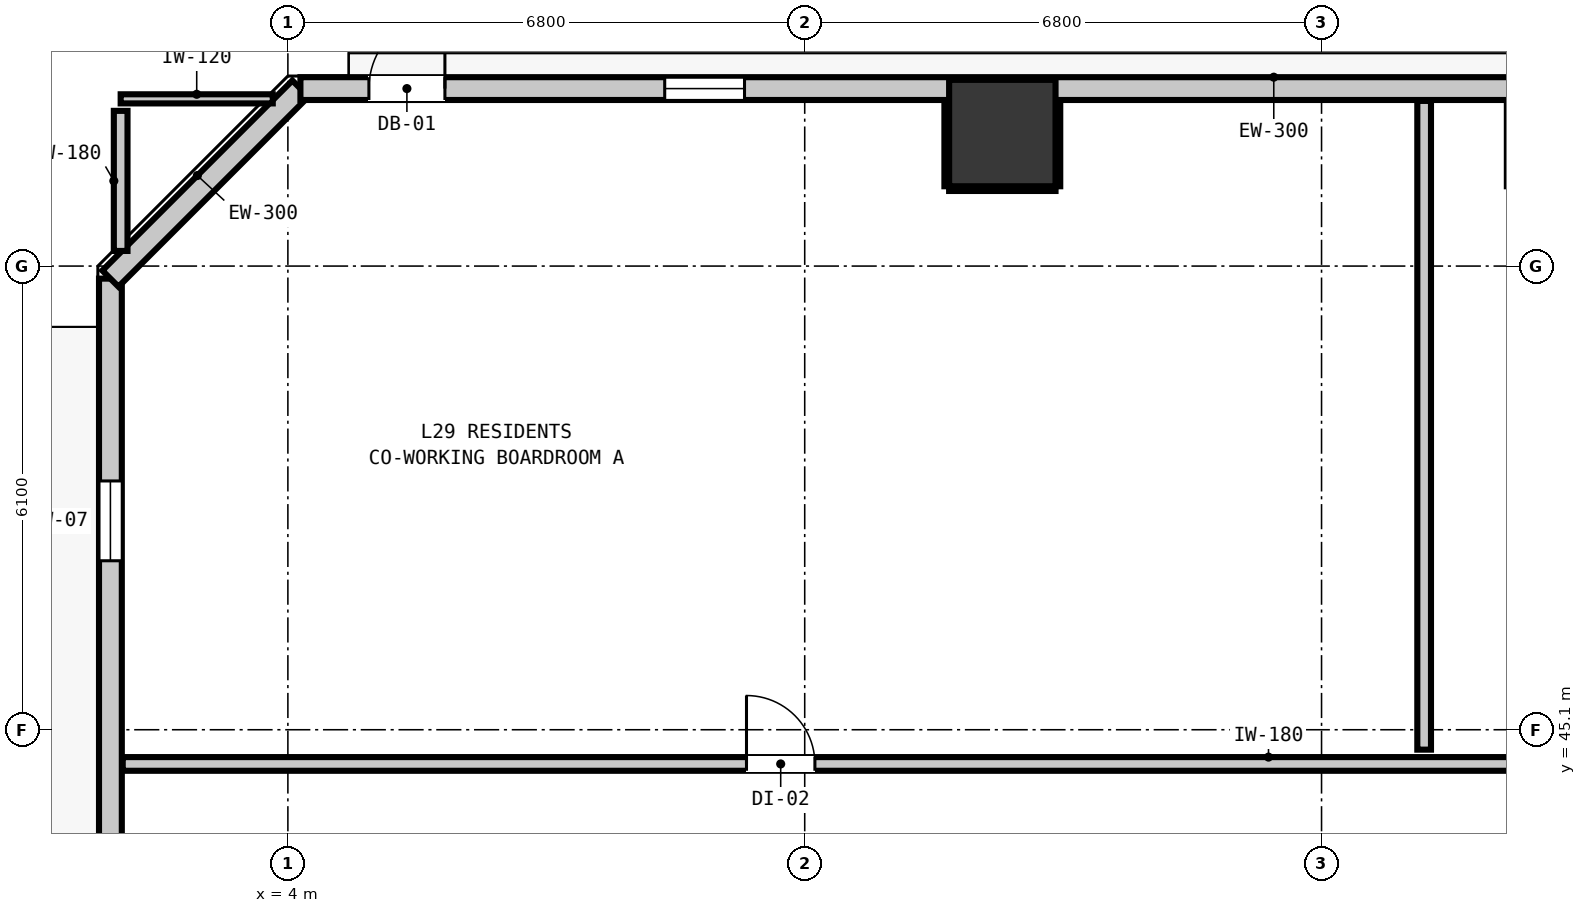
"""IFC4 building model, lengths in metres.
Left out: names, types, materials, properties, quantities, classifications, styles, units other than length and angle.
Written with IfcOpenShell. Run it as: python <this file> out.ifc"""

import sys

from ifc_helpers import new_model, si_unit, direction, frame, frame_2d, origin, origin_2d, place, context, subcontext, project, spatial, rectangle, extrude, element, fill, save


model = new_model("IFC4")
c1 = context("Model", 3, precision=1e-05, world=origin(), true_north=direction((0.0, 1.0)))
c2 = subcontext(c1, "Body", "Model", "MODEL_VIEW")
j1 = project(units=[si_unit("LENGTHUNIT", "METRE"), si_unit("PLANEANGLEUNIT", "RADIAN")], contexts=[c1])
p1 = place(None, origin())
s1 = spatial("IfcSite", under=j1, at=p1, CompositionType="ELEMENT")
p2 = place(p1, origin())
s2 = spatial("IfcBuilding", under=s1, at=p2, CompositionType="ELEMENT")
p3 = place(p2, frame((0.0, 0.0, 102.76)))
s3 = spatial("IfcBuildingStorey", under=s2, at=p3, CompositionType="ELEMENT", Elevation=102.76)
p4 = place(p3, frame((13.4, 52.95, 0.0), z_axis=(0.0, 0.0, 1.0), x_axis=(1.0, 0.0, 0.0)))
e1 = element("IfcColumn", 1, at=p4, inside=s3, PredefinedType="COLUMN", context=c2, shape_type="SweptSolid", body=[
    extrude(rectangle(XDim=1.4, YDim=1.4, at=origin_2d()), origin(), (0.0, 0.0, 1.0), 2.9),
])
p5 = place(p3, frame((1.665, 16.365, 0.0), z_axis=(0.0, 0.0, 1.0), x_axis=(0.0, 1.0, 0.0)))
e2 = element("IfcWall", 2, at=p5, inside=s3, PredefinedType="STANDARD", context=c2, shape_type="SweptSolid", body=[
    extrude(rectangle(XDim=34.67, YDim=0.3, at=frame_2d((17.335, 0.0))), origin(), (0.0, 0.0, 1.0), 2.9),
])
p6 = place(p5, frame((8.955, 0.0, 0.0)))
e3 = element("IfcOpeningElement", 3, at=p6, cuts=e2, PredefinedType="OPENING", context=c2, shape_type="SweptSolid", body=[
    extrude(rectangle(XDim=1.0, YDim=2.15, at=frame_2d((0.5, 1.075))), frame((0.0, 0.16, 0.0), z_axis=(0.0, -1.0, 0.0), x_axis=(1.0, 0.0, 0.0)), (0.0, 0.0, 1.0), 0.32),
])
p7 = place(p5, frame((30.958, 0.0, 0.85)))
e4 = element("IfcOpeningElement", 4, at=p7, cuts=e2, PredefinedType="OPENING", context=c2, shape_type="SweptSolid", body=[
    extrude(rectangle(XDim=1.05, YDim=1.65, at=frame_2d((0.525, 0.825))), frame((0.0, 0.16, 0.0), z_axis=(0.0, -1.0, 0.0), x_axis=(1.0, 0.0, 0.0)), (0.0, 0.0, 1.0), 0.32),
])
p8 = place(p5, frame((10.88, 0.0, 0.85)))
e5 = element("IfcOpeningElement", 5, at=p8, cuts=e2, PredefinedType="OPENING", context=c2, shape_type="SweptSolid", body=[
    extrude(rectangle(XDim=1.05, YDim=1.65, at=frame_2d((0.525, 0.825))), frame((0.0, 0.16, 0.0), z_axis=(0.0, -1.0, 0.0), x_axis=(1.0, 0.0, 0.0)), (0.0, 0.0, 1.0), 0.32),
])
p9 = place(p5, frame((15.41, 0.0, 0.85)))
e6 = element("IfcOpeningElement", 6, at=p9, cuts=e2, PredefinedType="OPENING", context=c2, shape_type="SweptSolid", body=[
    extrude(rectangle(XDim=1.05, YDim=1.65, at=frame_2d((0.525, 0.825))), frame((0.0, 0.16, 0.0), z_axis=(0.0, -1.0, 0.0), x_axis=(1.0, 0.0, 0.0)), (0.0, 0.0, 1.0), 0.32),
])
p10 = place(p3, frame((1.665, 51.035, 0.0), z_axis=(0.0, 0.0, 1.0), x_axis=(0.707106781187, 0.707106781187, 0.0)))
e7 = element("IfcWall", 7, at=p10, inside=s3, PredefinedType="STANDARD", context=c2, shape_type="SweptSolid", body=[
    extrude(rectangle(XDim=3.536, YDim=0.3, at=frame_2d((1.768, 0.0))), origin(), (0.0, 0.0, 1.0), 2.9),
])
p11 = place(p3, frame((4.165, 53.535, 0.0), z_axis=(0.0, 0.0, 1.0), x_axis=(1.0, 0.0, 0.0)))
e8 = element("IfcWall", 8, at=p11, inside=s3, PredefinedType="STANDARD", context=c2, shape_type="SweptSolid", body=[
    extrude(rectangle(XDim=37.47, YDim=0.3, at=frame_2d((18.735, 0.0))), origin(), (0.0, 0.0, 1.0), 2.9),
])
p12 = place(p11, frame((0.901, 0.0, 0.0)))
e9 = element("IfcOpeningElement", 9, at=p12, cuts=e8, PredefinedType="OPENING", context=c2, shape_type="SweptSolid", body=[
    extrude(rectangle(XDim=1.0, YDim=2.15, at=frame_2d((0.5, 1.075))), frame((0.0, 0.16, 0.0), z_axis=(0.0, -1.0, 0.0), x_axis=(1.0, 0.0, 0.0)), (0.0, 0.0, 1.0), 0.32),
])
p13 = place(p11, frame((4.793, 0.0, 0.85)))
e10 = element("IfcOpeningElement", 10, at=p13, cuts=e8, PredefinedType="OPENING", context=c2, shape_type="SweptSolid", body=[
    extrude(rectangle(XDim=1.05, YDim=1.65, at=frame_2d((0.525, 0.825))), frame((0.0, 0.16, 0.0), z_axis=(0.0, -1.0, 0.0), x_axis=(1.0, 0.0, 0.0)), (0.0, 0.0, 1.0), 0.32),
])
p14 = place(p11, frame((19.77, 0.0, 0.85)))
e11 = element("IfcOpeningElement", 11, at=p14, cuts=e8, PredefinedType="OPENING", context=c2, shape_type="SweptSolid", body=[
    extrude(rectangle(XDim=1.05, YDim=1.65, at=frame_2d((0.525, 0.825))), frame((0.0, 0.16, 0.0), z_axis=(0.0, -1.0, 0.0), x_axis=(1.0, 0.0, 0.0)), (0.0, 0.0, 1.0), 0.32),
])
p15 = place(p11, frame((29.492, 0.0, 0.85)))
e12 = element("IfcOpeningElement", 12, at=p15, cuts=e8, PredefinedType="OPENING", context=c2, shape_type="SweptSolid", body=[
    extrude(rectangle(XDim=1.05, YDim=1.65, at=frame_2d((0.525, 0.825))), frame((0.0, 0.16, 0.0), z_axis=(0.0, -1.0, 0.0), x_axis=(1.0, 0.0, 0.0)), (0.0, 0.0, 1.0), 0.32),
])
p16 = place(p11, frame((26.442, 0.0, 0.85)))
e13 = element("IfcOpeningElement", 13, at=p16, cuts=e8, PredefinedType="OPENING", context=c2, shape_type="SweptSolid", body=[
    extrude(rectangle(XDim=1.05, YDim=1.65, at=frame_2d((0.525, 0.825))), frame((0.0, 0.16, 0.0), z_axis=(0.0, -1.0, 0.0), x_axis=(1.0, 0.0, 0.0)), (0.0, 0.0, 1.0), 0.32),
])
p17 = place(p11, frame((35.578, 0.0, 0.85)))
e14 = element("IfcOpeningElement", 14, at=p17, cuts=e8, PredefinedType="OPENING", context=c2, shape_type="SweptSolid", body=[
    extrude(rectangle(XDim=1.05, YDim=1.65, at=frame_2d((0.525, 0.825))), frame((0.0, 0.16, 0.0), z_axis=(0.0, -1.0, 0.0), x_axis=(1.0, 0.0, 0.0)), (0.0, 0.0, 1.0), 0.32),
])
p18 = place(p3, frame((1.827, 44.65, 0.0), z_axis=(0.0, 0.0, 1.0), x_axis=(1.0, 0.0, 0.0)))
e15 = element("IfcWall", 15, at=p18, inside=s3, PredefinedType="PARTITIONING", context=c2, shape_type="SweptSolid", body=[
    extrude(rectangle(XDim=42.146, YDim=0.18, at=frame_2d((21.073, 0.0))), origin(), (0.0, 0.0, 1.0), 2.9),
])
p19 = place(p18, frame((8.207, 0.0, 0.0)))
e16 = element("IfcOpeningElement", 16, at=p19, cuts=e15, PredefinedType="OPENING", context=c2, shape_type="SweptSolid", body=[
    extrude(rectangle(XDim=0.9, YDim=2.1, at=frame_2d((0.45, 1.05))), frame((0.0, 0.1, 0.0), z_axis=(0.0, -1.0, 0.0), x_axis=(1.0, 0.0, 0.0)), (0.0, 0.0, 1.0), 0.2),
])
p20 = place(p18, frame((21.043, 0.0, 0.0)))
e17 = element("IfcOpeningElement", 17, at=p20, cuts=e15, PredefinedType="OPENING", context=c2, shape_type="SweptSolid", body=[
    extrude(rectangle(XDim=0.9, YDim=2.1, at=frame_2d((0.45, 1.05))), frame((0.0, 0.1, 0.0), z_axis=(0.0, -1.0, 0.0), x_axis=(1.0, 0.0, 0.0)), (0.0, 0.0, 1.0), 0.2),
])
p21 = place(p18, frame((32.951, 0.0, 0.0)))
e18 = element("IfcOpeningElement", 18, at=p21, cuts=e15, PredefinedType="OPENING", context=c2, shape_type="SweptSolid", body=[
    extrude(rectangle(XDim=1.0, YDim=2.15, at=frame_2d((0.5, 1.075))), frame((0.0, 0.1, 0.0), z_axis=(0.0, -1.0, 0.0), x_axis=(1.0, 0.0, 0.0)), (0.0, 0.0, 1.0), 0.2),
])
p22 = place(p3, frame((1.8, 53.4, 0.0), z_axis=(0.0, 0.0, 1.0), x_axis=(1.0, 0.0, 0.0)))
e19 = element("IfcWall", 19, at=p22, inside=s3, PredefinedType="PARTITIONING", context=c2, shape_type="SweptSolid", body=[
    extrude(rectangle(XDim=2.001, YDim=0.12, at=frame_2d((1.0, 0.0))), origin(), (0.0, 0.0, 1.0), 2.9),
])
p23 = place(p3, frame((1.8, 51.399, 0.0), z_axis=(0.0, 0.0, 1.0), x_axis=(0.0, 1.0, 0.0)))
e20 = element("IfcWall", 20, at=p23, inside=s3, PredefinedType="PARTITIONING", context=c2, shape_type="SweptSolid", body=[
    extrude(rectangle(XDim=1.843, YDim=0.18, at=frame_2d((0.921, 0.0))), origin(), (0.0, 0.0, 1.0), 2.9),
])
p24 = place(p3, frame((18.95, 44.838, 0.0), z_axis=(0.0, 0.0, 1.0), x_axis=(0.0, 1.0, 0.0)))
e21 = element("IfcWall", 21, at=p24, inside=s3, PredefinedType="PARTITIONING", context=c2, shape_type="SweptSolid", body=[
    extrude(rectangle(XDim=8.535, YDim=0.18, at=frame_2d((4.268, 0.0))), origin(), (0.0, 0.0, 1.0), 2.9),
])
p25 = place(p3, frame((12.7, 52.218, 0.0), z_axis=(0.0, 0.0, 1.0), x_axis=(1.0, 0.0, 0.0)))
e22 = element("IfcWall", 22, at=p25, inside=s3, PredefinedType="PARTITIONING", context=c2, shape_type="SweptSolid", body=[
    extrude(rectangle(XDim=1.4, YDim=0.06, at=frame_2d((0.7, 0.0))), origin(), (0.0, 0.0, 1.0), 1.45),
])
for number, where, z_axis, x_axis in (
    (23, (12.668, 52.25, 0.0), (0.0, 0.0, 1.0), (0.0, 1.0, 0.0)),
    (24, (14.132, 52.25, 0.0), (0.0, 0.0, 1.0), (0.0, 1.0, 0.0)),
):
    element("IfcWall", number, at=place(p3, frame(where, z_axis=z_axis, x_axis=x_axis)), inside=s3, PredefinedType="PARTITIONING", context=c2, shape_type="SweptSolid", body=[
        extrude(rectangle(XDim=1.12, YDim=0.06, at=frame_2d((0.56, 0.0))), origin(), (0.0, 0.0, 1.0), 1.45),
    ])
p26 = place(p12, origin())
e25 = element("IfcDoor", 25, at=p26, inside=s3, OperationType="SINGLE_SWING_RIGHT", PredefinedType="DOOR", context=c2, shape_type="SweptSolid", body=[
    extrude(rectangle(XDim=1.0, YDim=2.15, at=frame_2d((0.5, 1.075))), frame((0.0, 0.025, 0.0), z_axis=(0.0, -1.0, 0.0), x_axis=(1.0, 0.0, 0.0)), (0.0, 0.0, 1.0), 0.05),
])
fill(e9, e25)
p27 = place(p7, origin())
e26 = element("IfcWindow", 26, at=p27, inside=s3, PartitioningType="SINGLE_PANEL", PredefinedType="WINDOW", context=c2, shape_type="SweptSolid", body=[
    extrude(rectangle(XDim=1.05, YDim=1.65, at=frame_2d((0.525, 0.825))), frame((0.0, 0.03, 0.0), z_axis=(0.0, -1.0, 0.0), x_axis=(1.0, 0.0, 0.0)), (0.0, 0.0, 1.0), 0.06),
])
fill(e4, e26)
p28 = place(p13, origin())
e27 = element("IfcWindow", 27, at=p28, inside=s3, PartitioningType="SINGLE_PANEL", PredefinedType="WINDOW", context=c2, shape_type="SweptSolid", body=[
    extrude(rectangle(XDim=1.05, YDim=1.65, at=frame_2d((0.525, 0.825))), frame((0.0, 0.03, 0.0), z_axis=(0.0, -1.0, 0.0), x_axis=(1.0, 0.0, 0.0)), (0.0, 0.0, 1.0), 0.06),
])
fill(e10, e27)
p29 = place(p19, origin())
e28 = element("IfcDoor", 28, at=p29, inside=s3, OperationType="SINGLE_SWING_LEFT", PredefinedType="DOOR", context=c2, shape_type="SweptSolid", body=[
    extrude(rectangle(XDim=0.9, YDim=2.1, at=frame_2d((0.45, 1.05))), frame((0.0, 0.025, 0.0), z_axis=(0.0, -1.0, 0.0), x_axis=(1.0, 0.0, 0.0)), (0.0, 0.0, 1.0), 0.05),
])
fill(e16, e28)
save(model, sys.argv[1])
